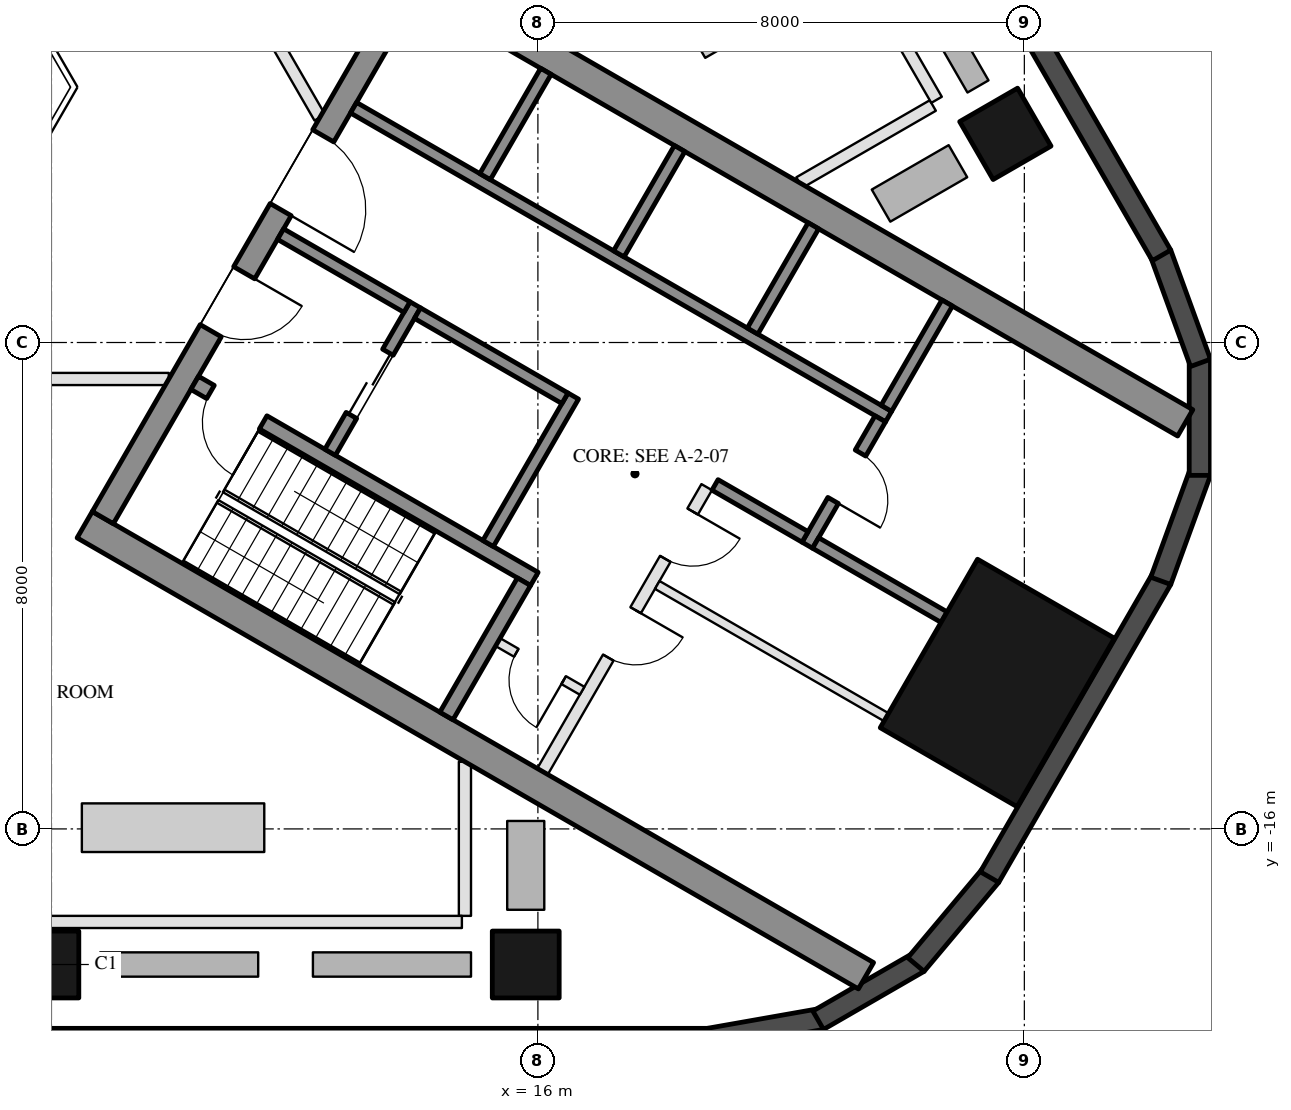
"""IFC4 building model, lengths in metres.
Left out: names, types, materials, properties, quantities, classifications, styles, units other than length and angle.
Written with IfcOpenShell. Run it as: python <this file> out.ifc"""

import sys

from ifc_helpers import new_model, si_unit, direction, frame, frame_2d, origin, origin_2d, place, context, subcontext, project, spatial, rectangle, hollow_rectangle, extrude, boolean, halfspace, element, fill, save


model = new_model("IFC4")
c1 = context("Model", 3, precision=1e-05, world=origin(), true_north=direction((0.0, 1.0)))
c2 = subcontext(c1, "Body", "Model", "MODEL_VIEW")
j1 = project(units=[si_unit("LENGTHUNIT", "METRE"), si_unit("PLANEANGLEUNIT", "RADIAN")], contexts=[c1])
p1 = place(None, origin())
s1 = spatial("IfcSite", under=j1, at=p1, CompositionType="ELEMENT")
p2 = place(p1, origin())
s2 = spatial("IfcBuilding", under=s1, at=p2, CompositionType="ELEMENT")
p3 = place(p2, frame((0.0, 0.0, 37.5)))
s3 = spatial("IfcBuildingStorey", under=s2, at=p3, CompositionType="ELEMENT", Elevation=37.5)
p4 = place(p3, frame((7.9, -18.23, 0.0), z_axis=(0.0, 0.0, 1.0), x_axis=(-1.0, 0.0, 0.0)))
e1 = element("IfcColumn", 1, at=p4, inside=s3, PredefinedType="COLUMN", context=c2, shape_type="SweptSolid", body=[
    boolean("DIFFERENCE", extrude(hollow_rectangle(XDim=1.1, YDim=1.1, WallThickness=0.05, at=origin_2d()), origin(), (0.0, 0.0, 1.0), 4.5), halfspace(frame((0.0, 0.0, 0.006), z_axis=(0.0, 0.0, 1.0), x_axis=(1.0, 0.0, 0.0)), True)),
])
for number, where, z_axis, x_axis in (
    (2, (15.8, -18.23, 0.0), (0.0, 0.0, 1.0), (-1.0, 0.0, 0.0)),
    (3, (23.688, -4.568, 0.0), (0.0, 0.0, 1.0), (-0.5, 0.866, 0.0)),
):
    element("IfcColumn", number, at=place(p3, frame(where, z_axis=z_axis, x_axis=x_axis)), inside=s3, PredefinedType="COLUMN", context=c2, shape_type="SweptSolid", body=[
        boolean("DIFFERENCE", extrude(hollow_rectangle(XDim=1.1, YDim=1.1, WallThickness=0.05, at=origin_2d()), origin(), (0.0, 0.0, 1.0), 4.5), halfspace(frame((0.0, 0.0, 0.007), z_axis=(0.0, 0.0, 1.0), x_axis=(1.0, 0.0, 0.0)), True)),
    ])
p5 = place(p3, frame((23.556, -13.6, 0.0), z_axis=(0.0, 0.0, 1.0), x_axis=(0.5, 0.866025403784, 0.0)))
e4 = element("IfcColumn", 4, at=p5, inside=s3, PredefinedType="COLUMN", context=c2, shape_type="SweptSolid", body=[
    extrude(hollow_rectangle(XDim=3.2, YDim=2.6, WallThickness=0.08, at=origin_2d()), origin(), (0.0, 0.0, 1.0), 4.5),
])
p6 = place(p3, frame((-18.816, -19.455, 0.0), z_axis=(0.0, 0.0, 1.0), x_axis=(1.0, 0.0, 0.0)))
e5 = element("IfcWall", 5, at=p6, inside=s3, PredefinedType="SOLIDWALL", context=c2, shape_type="SweptSolid", body=[
    extrude(rectangle(XDim=37.632, YDim=0.35, at=frame_2d((18.816, 0.0))), origin(), (0.0, 0.0, 1.0), 4.2),
])
p7 = place(p3, frame((18.785, -19.458, 0.0), z_axis=(0.0, 0.0, 1.0), x_axis=(0.984798995425, 0.173697837091, 0.0)))
e6 = element("IfcWall", 6, at=p7, inside=s3, PredefinedType="SOLIDWALL", context=c2, shape_type="SweptSolid", body=[
    extrude(rectangle(XDim=1.91, YDim=0.35, at=frame_2d((0.955, 0.0))), origin(), (0.0, 0.0, 1.0), 4.2),
])
for number, where, z_axis, x_axis in (
    (7, (20.61, -19.147, 0.0), (0.0, 0.0, 1.0), (0.866, 0.5, 0.0)),
    (8, (22.217, -18.231, 0.0), (0.0, 0.0, 1.0), (0.643, 0.766, 0.0)),
):
    element("IfcWall", number, at=place(p3, frame(where, z_axis=z_axis, x_axis=x_axis)), inside=s3, PredefinedType="SOLIDWALL", context=c2, shape_type="SweptSolid", body=[
        extrude(rectangle(XDim=1.91, YDim=0.35, at=frame_2d((0.955, 0.0))), origin(), (0.0, 0.0, 1.0), 4.2),
    ])
p8 = place(p3, frame((23.427, -16.792, 0.0), z_axis=(0.0, 0.0, 1.0), x_axis=(0.499986410639, 0.866033249463, 0.0)))
e9 = element("IfcWall", 9, at=p8, inside=s3, PredefinedType="SOLIDWALL", context=c2, shape_type="SweptSolid", body=[
    extrude(rectangle(XDim=5.658, YDim=0.35, at=frame_2d((2.829, 0.0))), origin(), (0.0, 0.0, 1.0), 4.2),
])
for number, where, z_axis, x_axis in (
    (10, (26.244, -11.92, 0.0), (0.0, 0.0, 1.0), (0.342, 0.94, 0.0)),
    (11, (26.886, -10.185, 0.0), (0.0, 0.0, 1.0), (0.0, 1.0, 0.0)),
    (12, (26.897, -8.335, 0.0), (0.0, 0.0, 1.0), (-0.342, 0.94, 0.0)),
):
    element("IfcWall", number, at=place(p3, frame(where, z_axis=z_axis, x_axis=x_axis)), inside=s3, PredefinedType="SOLIDWALL", context=c2, shape_type="SweptSolid", body=[
        extrude(rectangle(XDim=1.91, YDim=0.35, at=frame_2d((0.955, 0.0))), origin(), (0.0, 0.0, 1.0), 4.2),
    ])
p9 = place(p3, frame((26.256, -6.567, 0.0), z_axis=(0.0, 0.0, 1.0), x_axis=(-0.499998380999, 0.866026338513, 0.0)))
e13 = element("IfcWall", 13, at=p9, inside=s3, PredefinedType="SOLIDWALL", context=c2, shape_type="SweptSolid", body=[
    extrude(rectangle(XDim=37.631, YDim=0.35, at=frame_2d((18.816, 0.0))), origin(), (0.0, 0.0, 1.0), 4.2),
])
for number, where, z_axis, x_axis in (
    (14, (8.547, -10.997, 0.0), (0.0, 0.0, 1.0), (0.866, -0.5, 0.0)),
    (15, (13.797, -1.903, 0.0), (0.0, 0.0, 1.0), (0.866, -0.5, 0.0)),
):
    element("IfcWall", number, at=place(p3, frame(where, z_axis=z_axis, x_axis=x_axis)), inside=s3, PredefinedType="SHEAR", context=c2, shape_type="SweptSolid", body=[
        extrude(rectangle(XDim=14.837, YDim=0.5, at=frame_2d((7.418, 0.0))), origin(), (0.0, 0.0, 1.0), 4.2),
    ])
p10 = place(p3, frame((8.845, -10.88, 0.0), z_axis=(0.0, 0.0, 1.0), x_axis=(0.500004234368, 0.866022959057, 0.0)))
e16 = element("IfcWall", 16, at=p10, inside=s3, PredefinedType="SHEAR", context=c2, shape_type="SweptSolid", body=[
    extrude(rectangle(XDim=10.0, YDim=0.4, at=frame_2d((5.0, 0.0))), origin(), (0.0, 0.0, 1.0), 4.2),
])
p11 = place(p10, frame((3.55, 0.0, 0.0)))
e17 = element("IfcOpeningElement", 17, at=p11, cuts=e16, PredefinedType="OPENING", context=c2, shape_type="SweptSolid", body=[
    extrude(rectangle(XDim=1.1, YDim=2.1, at=frame_2d((0.55, 1.05))), frame((0.0, 0.21, 0.0), z_axis=(0.0, -1.0, 0.0), x_axis=(1.0, 0.0, 0.0)), (0.0, 0.0, 1.0), 0.42),
])
p12 = place(p10, frame((5.85, 0.0, 0.0)))
e18 = element("IfcOpeningElement", 18, at=p12, cuts=e16, PredefinedType="OPENING", context=c2, shape_type="SweptSolid", body=[
    extrude(rectangle(XDim=1.4, YDim=2.1, at=frame_2d((0.7, 1.05))), frame((0.0, 0.21, 0.0), z_axis=(0.0, -1.0, 0.0), x_axis=(1.0, 0.0, 0.0)), (0.0, 0.0, 1.0), 0.42),
])
p13 = place(p3, frame((10.356, -8.664, 0.0), z_axis=(0.0, 0.0, 1.0), x_axis=(0.866028629588, -0.499994412703, 0.0)))
e19 = element("IfcWall", 19, at=p13, inside=s3, PredefinedType="SHEAR", context=c2, shape_type="SweptSolid", body=[
    extrude(rectangle(XDim=6.45, YDim=0.25, at=frame_2d((3.225, 0.0))), origin(), (0.0, 0.0, 1.0), 4.2),
])
p14 = place(p13, frame((0.3, 0.0, 0.0)))
e20 = element("IfcOpeningElement", 20, at=p14, cuts=e19, PredefinedType="OPENING", context=c2, shape_type="SweptSolid", body=[
    extrude(rectangle(XDim=1.0, YDim=2.1, at=frame_2d((0.5, 1.05))), frame((0.0, 0.135, 0.0), z_axis=(0.0, -1.0, 0.0), x_axis=(1.0, 0.0, 0.0)), (0.0, 0.0, 1.0), 0.27),
])
p15 = place(p3, frame((14.496, -14.143, 0.0), z_axis=(0.0, 0.0, 1.0), x_axis=(0.500062241894, 0.865989465428, 0.0)))
e21 = element("IfcWall", 21, at=p15, inside=s3, PredefinedType="SHEAR", context=c2, shape_type="SweptSolid", body=[
    extrude(rectangle(XDim=2.55, YDim=0.25, at=frame_2d((1.275, 0.0))), origin(), (0.0, 0.0, 1.0), 4.2),
])
p16 = place(p3, frame((15.181, -11.305, 0.0), z_axis=(0.0, 0.0, 1.0), x_axis=(0.49994636267, 0.866056369097, 0.0)))
e22 = element("IfcWall", 22, at=p16, inside=s3, PredefinedType="SHEAR", context=c2, shape_type="SweptSolid", body=[
    extrude(rectangle(XDim=2.8, YDim=0.2, at=frame_2d((1.4, 0.0))), origin(), (0.0, 0.0, 1.0), 4.2),
])
p17 = place(p3, frame((12.583, -9.805, 0.0), z_axis=(0.0, 0.0, 1.0), x_axis=(0.49994636267, 0.866056369097, 0.0)))
e23 = element("IfcWall", 23, at=p17, inside=s3, PredefinedType="SHEAR", context=c2, shape_type="SweptSolid", body=[
    extrude(rectangle(XDim=2.8, YDim=0.2, at=frame_2d((1.4, 0.0))), origin(), (0.0, 0.0, 1.0), 4.2),
])
p18 = place(p17, frame((0.7, 0.0, 0.0)))
e24 = element("IfcOpeningElement", 24, at=p18, cuts=e23, PredefinedType="OPENING", context=c2, shape_type="SweptSolid", body=[
    extrude(rectangle(XDim=1.2, YDim=2.1, at=frame_2d((0.6, 1.05))), frame((0.0, 0.11, 0.0), z_axis=(0.0, -1.0, 0.0), x_axis=(1.0, 0.0, 0.0)), (0.0, 0.0, 1.0), 0.22),
])
p19 = place(p3, frame((11.768, -6.217, 0.0), z_axis=(0.0, 0.0, 1.0), x_axis=(0.866050077142, -0.499957262057, 0.0)))
e25 = element("IfcWall", 25, at=p19, inside=s3, PredefinedType="SHEAR", context=c2, shape_type="SweptSolid", body=[
    extrude(rectangle(XDim=2.4, YDim=0.2, at=frame_2d((1.2, 0.0))), origin(), (0.0, 0.0, 1.0), 4.2),
])
p20 = place(p3, frame((14.02, -7.517, 0.0), z_axis=(0.0, 0.0, 1.0), x_axis=(0.866034573852, -0.49998411664, 0.0)))
e26 = element("IfcWall", 26, at=p20, inside=s3, PredefinedType="SHEAR", context=c2, shape_type="SweptSolid", body=[
    extrude(rectangle(XDim=2.8, YDim=0.2, at=frame_2d((1.4, 0.0))), origin(), (0.0, 0.0, 1.0), 4.2),
])
p21 = place(p3, frame((12.968, -4.138, 0.0), z_axis=(0.0, 0.0, 1.0), x_axis=(0.866028328073, -0.49999493495, 0.0)))
e27 = element("IfcWall", 27, at=p21, inside=s3, PredefinedType="SHEAR", context=c2, shape_type="SweptSolid", body=[
    extrude(rectangle(XDim=10.16, YDim=0.2, at=frame_2d((5.08, 0.0))), origin(), (0.0, 0.0, 1.0), 4.2),
])
p22 = place(p3, frame((20.43, -11.333, 0.0), z_axis=(0.0, 0.0, 1.0), x_axis=(0.500001309137, 0.866024647952, 0.0)))
e28 = element("IfcWall", 28, at=p22, inside=s3, PredefinedType="SHEAR", context=c2, shape_type="SweptSolid", body=[
    extrude(rectangle(XDim=2.4, YDim=0.2, at=frame_2d((1.2, 0.0))), origin(), (0.0, 0.0, 1.0), 4.2),
])
p23 = place(p22, frame((0.85, 0.0, 0.0)))
e29 = element("IfcOpeningElement", 29, at=p23, cuts=e28, PredefinedType="OPENING", context=c2, shape_type="SweptSolid", body=[
    extrude(rectangle(XDim=0.9, YDim=2.1, at=frame_2d((0.45, 1.05))), frame((0.0, 0.11, 0.0), z_axis=(0.0, -1.0, 0.0), x_axis=(1.0, 0.0, 0.0)), (0.0, 0.0, 1.0), 0.22),
])
p24 = place(p3, frame((18.913, -10.342, 0.0), z_axis=(0.0, 0.0, 1.0), x_axis=(0.866038183914, -0.499977863513, 0.0)))
e30 = element("IfcWall", 30, at=p24, inside=s3, PredefinedType="SHEAR", context=c2, shape_type="SweptSolid", body=[
    extrude(rectangle(XDim=1.71, YDim=0.2, at=frame_2d((0.855, 0.0))), origin(), (0.0, 0.0, 1.0), 4.2),
])
for number, where, z_axis, x_axis in (
    (31, (15.131, -5.272, 0.0), (0.0, 0.0, 1.0), (0.5, 0.866, 0.0)),
    (32, (17.331, -6.542, 0.0), (0.0, 0.0, 1.0), (0.5, 0.866, 0.0)),
    (33, (19.531, -7.812, 0.0), (0.0, 0.0, 1.0), (0.5, 0.866, 0.0)),
    (34, (21.73, -9.082, 0.0), (0.0, 0.0, 1.0), (0.5, 0.866, 0.0)),
):
    element("IfcWall", number, at=place(p3, frame(where, z_axis=z_axis, x_axis=x_axis)), inside=s3, PredefinedType="SHEAR", context=c2, shape_type="SweptSolid", body=[
        extrude(rectangle(XDim=2.0, YDim=0.2, at=frame_2d((1.0, 0.0))), origin(), (0.0, 0.0, 1.0), 4.2),
    ])
p25 = place(p3, frame((20.567, -11.297, 0.0), z_axis=(0.0, 0.0, 1.0), x_axis=(0.866048967903, -0.499959183527, 0.0)))
e35 = element("IfcWall", 35, at=p25, inside=s3, PredefinedType="SHEAR", context=c2, shape_type="SweptSolid", body=[
    extrude(rectangle(XDim=2.44, YDim=0.2, at=frame_2d((1.22, 0.0))), origin(), (0.0, 0.0, 1.0), 4.2),
])
p26 = place(p3, frame((16.076, -15.055, 0.0), z_axis=(0.0, 0.0, 1.0), x_axis=(0.499995103361, 0.866028230842, 0.0)))
e36 = element("IfcWall", 36, at=p26, inside=s3, PredefinedType="PARTITIONING", context=c2, shape_type="SweptSolid", body=[
    extrude(rectangle(XDim=5.4, YDim=0.2, at=frame_2d((2.7, 0.0))), origin(), (0.0, 0.0, 1.0), 4.2),
])
p27 = place(p26, frame((2.163, 0.0, 0.0)))
e37 = element("IfcOpeningElement", 37, at=p27, cuts=e36, PredefinedType="OPENING", context=c2, shape_type="SweptSolid", body=[
    extrude(rectangle(XDim=0.9, YDim=2.1, at=frame_2d((0.45, 1.05))), frame((0.0, 0.11, 0.0), z_axis=(0.0, -1.0, 0.0), x_axis=(1.0, 0.0, 0.0)), (0.0, 0.0, 1.0), 0.22),
])
p28 = place(p26, frame((4.038, 0.0, 0.0)))
e38 = element("IfcOpeningElement", 38, at=p28, cuts=e36, PredefinedType="OPENING", context=c2, shape_type="SweptSolid", body=[
    extrude(rectangle(XDim=0.9, YDim=2.1, at=frame_2d((0.45, 1.05))), frame((0.0, 0.11, 0.0), z_axis=(0.0, -1.0, 0.0), x_axis=(1.0, 0.0, 0.0)), (0.0, 0.0, 1.0), 0.22),
])
p29 = place(p3, frame((15.342, -12.928, 0.0), z_axis=(0.0, 0.0, 1.0), x_axis=(0.865989903783, -0.500061482766, 0.0)))
e39 = element("IfcWall", 39, at=p29, inside=s3, PredefinedType="PARTITIONING", context=c2, shape_type="SweptSolid", body=[
    extrude(rectangle(XDim=1.6, YDim=0.15, at=frame_2d((0.8, 0.0))), origin(), (0.0, 0.0, 1.0), 4.2),
])
p30 = place(p29, frame((0.35, 0.0, 0.0)))
e40 = element("IfcOpeningElement", 40, at=p30, cuts=e39, PredefinedType="OPENING", context=c2, shape_type="SweptSolid", body=[
    extrude(rectangle(XDim=0.9, YDim=2.1, at=frame_2d((0.45, 1.05))), frame((0.0, 0.085, 0.0), z_axis=(0.0, -1.0, 0.0), x_axis=(1.0, 0.0, 0.0)), (0.0, 0.0, 1.0), 0.17),
])
p31 = place(p3, frame((17.963, -11.987, 0.0), z_axis=(0.0, 0.0, 1.0), x_axis=(0.866013608182, -0.500020430026, 0.0)))
e41 = element("IfcWall", 41, at=p31, inside=s3, PredefinedType="PARTITIONING", context=c2, shape_type="SweptSolid", body=[
    extrude(rectangle(XDim=4.35, YDim=0.15, at=frame_2d((2.175, 0.0))), origin(), (0.0, 0.0, 1.0), 4.2),
])
p32 = place(p3, frame((14.8, -17.43, 0.0), z_axis=(0.0, 0.0, 1.0), x_axis=(0.0, 1.0, 0.0)))
e42 = element("IfcWall", 42, at=p32, inside=s3, PredefinedType="PARTITIONING", context=c2, shape_type="SweptSolid", body=[
    extrude(rectangle(XDim=2.534, YDim=0.2, at=frame_2d((1.267, 0.0))), origin(), (0.0, 0.0, 1.0), 4.2),
])
p33 = place(p3, frame((-14.75, -17.53, 0.0), z_axis=(0.0, 0.0, 1.0), x_axis=(1.0, 0.0, 0.0)))
e43 = element("IfcWall", 43, at=p33, inside=s3, PredefinedType="PARTITIONING", context=c2, shape_type="SweptSolid", body=[
    extrude(rectangle(XDim=29.5, YDim=0.2, at=frame_2d((14.75, 0.0))), origin(), (0.0, 0.0, 1.0), 3.41),
])
p34 = place(p3, frame((-9.93, -8.6, 0.0), z_axis=(0.0, 0.0, 1.0), x_axis=(1.0, 0.0, 0.0)))
e44 = element("IfcWall", 44, at=p34, inside=s3, PredefinedType="PARTITIONING", context=c2, shape_type="SweptSolid", body=[
    extrude(rectangle(XDim=19.861, YDim=0.2, at=frame_2d((9.93, 0.0))), origin(), (0.0, 0.0, 1.0), 3.41),
])
p35 = place(p34, frame((2.871, 0.0, 0.0)))
e45 = element("IfcOpeningElement", 45, at=p35, cuts=e44, PredefinedType="OPENING", context=c2, shape_type="SweptSolid", body=[
    extrude(rectangle(XDim=1.2, YDim=2.1, at=frame_2d((0.6, 1.05))), frame((0.0, 0.11, 0.0), z_axis=(0.0, -1.0, 0.0), x_axis=(1.0, 0.0, 0.0)), (0.0, 0.0, 1.0), 0.22),
])
p36 = place(p34, frame((9.581, 0.0, 0.0)))
e46 = element("IfcOpeningElement", 46, at=p36, cuts=e44, PredefinedType="OPENING", context=c2, shape_type="SweptSolid", body=[
    extrude(rectangle(XDim=1.2, YDim=2.1, at=frame_2d((0.6, 1.05))), frame((0.0, 0.11, 0.0), z_axis=(0.0, -1.0, 0.0), x_axis=(1.0, 0.0, 0.0)), (0.0, 0.0, 1.0), 0.22),
])
p37 = place(p34, frame((16.04, 0.0, 0.0)))
e47 = element("IfcOpeningElement", 47, at=p37, cuts=e44, PredefinedType="OPENING", context=c2, shape_type="SweptSolid", body=[
    extrude(rectangle(XDim=1.2, YDim=2.1, at=frame_2d((0.6, 1.05))), frame((0.0, 0.11, 0.0), z_axis=(0.0, -1.0, 0.0), x_axis=(1.0, 0.0, 0.0)), (0.0, 0.0, 1.0), 0.22),
])
p38 = place(p3, frame((22.495, -4.102, 0.0), z_axis=(0.0, 0.0, 1.0), x_axis=(-0.866065287345, -0.499930913282, 0.0)))
e48 = element("IfcWall", 48, at=p38, inside=s3, PredefinedType="PARTITIONING", context=c2, shape_type="SweptSolid", body=[
    extrude(rectangle(XDim=2.534, YDim=0.2, at=frame_2d((1.267, 0.0))), origin(), (0.0, 0.0, 1.0), 4.2),
])
p39 = place(p3, frame((22.556, -4.009, 0.0), z_axis=(0.0, 0.0, 1.0), x_axis=(-0.500002084189, 0.866024200474, 0.0)))
e49 = element("IfcWall", 49, at=p39, inside=s3, PredefinedType="PARTITIONING", context=c2, shape_type="SweptSolid", body=[
    extrude(rectangle(XDim=29.5, YDim=0.2, at=frame_2d((14.75, 0.0))), origin(), (0.0, 0.0, 1.0), 3.41),
])
p40 = place(p3, frame((12.413, -4.3, 0.0), z_axis=(0.0, 0.0, 1.0), x_axis=(-0.50000478328, 0.866022642139, 0.0)))
e50 = element("IfcWall", 50, at=p40, inside=s3, PredefinedType="PARTITIONING", context=c2, shape_type="SweptSolid", body=[
    extrude(rectangle(XDim=19.861, YDim=0.2, at=frame_2d((9.931, 0.0))), origin(), (0.0, 0.0, 1.0), 3.41),
])
p41 = place(p40, frame((2.371, 0.0, 0.0)))
e51 = element("IfcOpeningElement", 51, at=p41, cuts=e50, PredefinedType="OPENING", context=c2, shape_type="SweptSolid", body=[
    extrude(rectangle(XDim=1.2, YDim=2.1, at=frame_2d((0.6, 1.05))), frame((0.0, 0.11, 0.0), z_axis=(0.0, -1.0, 0.0), x_axis=(1.0, 0.0, 0.0)), (0.0, 0.0, 1.0), 0.22),
])
p42 = place(p40, frame((8.331, 0.0, 0.0)))
e52 = element("IfcOpeningElement", 52, at=p42, cuts=e50, PredefinedType="OPENING", context=c2, shape_type="SweptSolid", body=[
    extrude(rectangle(XDim=1.2, YDim=2.1, at=frame_2d((0.6, 1.05))), frame((0.0, 0.11, 0.0), z_axis=(0.0, -1.0, 0.0), x_axis=(1.0, 0.0, 0.0)), (0.0, 0.0, 1.0), 0.22),
])
p43 = place(p40, frame((15.29, 0.0, 0.0)))
e53 = element("IfcOpeningElement", 53, at=p43, cuts=e50, PredefinedType="OPENING", context=c2, shape_type="SweptSolid", body=[
    extrude(rectangle(XDim=1.2, YDim=2.1, at=frame_2d((0.6, 1.05))), frame((0.0, 0.11, 0.0), z_axis=(0.0, -1.0, 0.0), x_axis=(1.0, 0.0, 0.0)), (0.0, 0.0, 1.0), 0.22),
])
p44 = place(p18, origin())
e54 = element("IfcDoor", 54, at=p44, inside=s3, OperationType="DOUBLE_DOOR_SLIDING", PredefinedType="DOOR", context=c2, shape_type="SweptSolid", body=[
    extrude(rectangle(XDim=1.2, YDim=2.1, at=frame_2d((0.6, 1.05))), frame((0.0, 0.025, 0.0), z_axis=(0.0, -1.0, 0.0), x_axis=(1.0, 0.0, 0.0)), (0.0, 0.0, 1.0), 0.05),
])
fill(e24, e54)
p45 = place(p30, frame((0.9, 0.0, 0.0), z_axis=(0.0, 0.0, 1.0), x_axis=(-1.0, 0.0, 0.0)))
e55 = element("IfcDoor", 55, at=p45, inside=s3, OperationType="SINGLE_SWING_LEFT", PredefinedType="DOOR", context=c2, shape_type="SweptSolid", body=[
    extrude(rectangle(XDim=0.9, YDim=2.1, at=frame_2d((0.45, 1.05))), frame((0.0, 0.025, 0.0), z_axis=(0.0, -1.0, 0.0), x_axis=(1.0, 0.0, 0.0)), (0.0, 0.0, 1.0), 0.05),
])
fill(e40, e55)
p46 = place(p23, frame((0.9, 0.0, 0.0), z_axis=(0.0, 0.0, 1.0), x_axis=(-1.0, 0.0, 0.0)))
e56 = element("IfcDoor", 56, at=p46, inside=s3, OperationType="SINGLE_SWING_RIGHT", PredefinedType="DOOR", context=c2, shape_type="SweptSolid", body=[
    extrude(rectangle(XDim=0.9, YDim=2.1, at=frame_2d((0.45, 1.05))), frame((0.0, 0.025, 0.0), z_axis=(0.0, -1.0, 0.0), x_axis=(1.0, 0.0, 0.0)), (0.0, 0.0, 1.0), 0.05),
])
fill(e29, e56)
p47 = place(p27, frame((0.9, 0.0, 0.0), z_axis=(0.0, 0.0, 1.0), x_axis=(-1.0, 0.0, 0.0)))
e57 = element("IfcDoor", 57, at=p47, inside=s3, OperationType="SINGLE_SWING_LEFT", PredefinedType="DOOR", context=c2, shape_type="SweptSolid", body=[
    extrude(rectangle(XDim=0.9, YDim=2.1, at=frame_2d((0.45, 1.05))), frame((0.0, 0.025, 0.0), z_axis=(0.0, -1.0, 0.0), x_axis=(1.0, 0.0, 0.0)), (0.0, 0.0, 1.0), 0.05),
])
fill(e37, e57)
p48 = place(p28, frame((0.9, 0.0, 0.0), z_axis=(0.0, 0.0, 1.0), x_axis=(-1.0, 0.0, 0.0)))
e58 = element("IfcDoor", 58, at=p48, inside=s3, OperationType="SINGLE_SWING_LEFT", PredefinedType="DOOR", context=c2, shape_type="SweptSolid", body=[
    extrude(rectangle(XDim=0.9, YDim=2.1, at=frame_2d((0.45, 1.05))), frame((0.0, 0.025, 0.0), z_axis=(0.0, -1.0, 0.0), x_axis=(1.0, 0.0, 0.0)), (0.0, 0.0, 1.0), 0.05),
])
fill(e38, e58)
p49 = place(p11, frame((1.1, 0.0, 0.0), z_axis=(0.0, 0.0, 1.0), x_axis=(-1.0, 0.0, 0.0)))
e59 = element("IfcDoor", 59, at=p49, inside=s3, OperationType="SINGLE_SWING_LEFT", PredefinedType="DOOR", context=c2, shape_type="SweptSolid", body=[
    extrude(rectangle(XDim=1.1, YDim=2.1, at=frame_2d((0.55, 1.05))), frame((0.0, 0.025, 0.0), z_axis=(0.0, -1.0, 0.0), x_axis=(1.0, 0.0, 0.0)), (0.0, 0.0, 1.0), 0.05),
])
fill(e17, e59)
p50 = place(p12, frame((1.4, 0.0, 0.0), z_axis=(0.0, 0.0, 1.0), x_axis=(-1.0, 0.0, 0.0)))
e60 = element("IfcDoor", 60, at=p50, inside=s3, OperationType="DOUBLE_DOOR_SINGLE_SWING", PredefinedType="DOOR", context=c2, shape_type="SweptSolid", body=[
    extrude(rectangle(XDim=1.4, YDim=2.1, at=frame_2d((0.7, 1.05))), frame((0.0, 0.025, 0.0), z_axis=(0.0, -1.0, 0.0), x_axis=(1.0, 0.0, 0.0)), (0.0, 0.0, 1.0), 0.05),
])
fill(e18, e60)
p51 = place(p14, frame((1.0, 0.0, 0.0), z_axis=(0.0, 0.0, 1.0), x_axis=(-1.0, 0.0, 0.0)))
e61 = element("IfcDoor", 61, at=p51, inside=s3, OperationType="SINGLE_SWING_LEFT", PredefinedType="DOOR", context=c2, shape_type="SweptSolid", body=[
    extrude(rectangle(XDim=1.0, YDim=2.1, at=frame_2d((0.5, 1.05))), frame((0.0, 0.025, 0.0), z_axis=(0.0, -1.0, 0.0), x_axis=(1.0, 0.0, 0.0)), (0.0, 0.0, 1.0), 0.05),
])
fill(e20, e61)
save(model, sys.argv[1])
